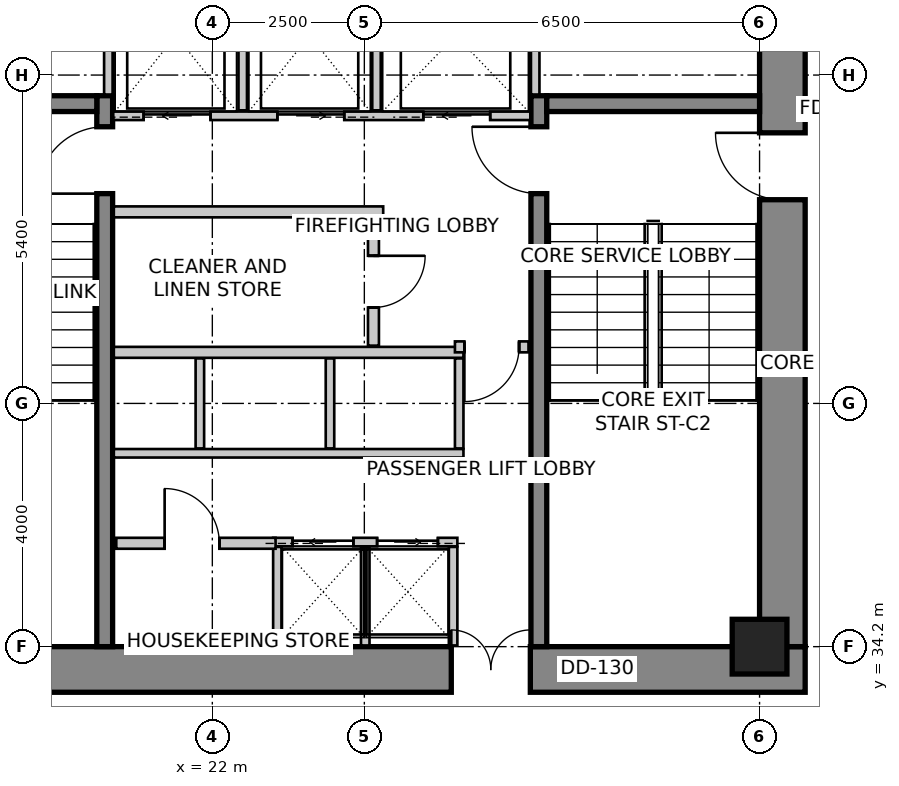
"""IFC4 building model, lengths in metres.
Left out: names, types, materials, properties, quantities, classifications, styles, units other than length and angle.
Written with IfcOpenShell. Run it as: python <this file> out.ifc"""

import sys

from ifc_helpers import new_model, si_unit, direction, frame, frame_2d, origin, origin_2d, place, context, subcontext, project, spatial, rectangle, extrude, source, transform, mapped, element, fill, save


model = new_model("IFC4")
c1 = context("Model", 3, precision=1e-05, world=origin(), true_north=direction((0.0, 1.0)))
c2 = subcontext(c1, "Body", "Model", "MODEL_VIEW")
j1 = project(units=[si_unit("LENGTHUNIT", "METRE"), si_unit("PLANEANGLEUNIT", "RADIAN")], contexts=[c1])
p1 = place(None, origin())
s1 = spatial("IfcSite", under=j1, at=p1, CompositionType="ELEMENT")
p2 = place(p1, origin())
s2 = spatial("IfcBuilding", under=s1, at=p2, CompositionType="ELEMENT")
p3 = place(p2, frame((0.0, 0.0, 110.6)))
s3 = spatial("IfcBuildingStorey", under=s2, at=p3, CompositionType="ELEMENT", Elevation=110.6)
p4 = place(p3, frame((15.85, 33.825, 0.0), z_axis=(0.0, 0.0, 1.0), x_axis=(1.0, 0.0, 0.0)))
e1 = element("IfcWall", 1, at=p4, inside=s3, PredefinedType="SHEAR", context=c2, shape_type="SweptSolid", body=[
    extrude(rectangle(XDim=15.9, YDim=0.75, at=frame_2d((7.95, 0.0))), origin(), (0.0, 0.0, 1.0), 3.6),
])
m1 = source(origin(), c2, "Body", "SweptSolid", [
    extrude(rectangle(XDim=1.3, YDim=2.15, at=frame_2d((0.65, 1.075))), frame((0.0, 0.385, 0.0), z_axis=(0.0, -1.0, 0.0), x_axis=(1.0, 0.0, 0.0)), (0.0, 0.0, 1.0), 0.77),
])
p5 = place(p4, frame((10.08, 0.0, 0.0)))
e2 = element("IfcOpeningElement", 2, at=p5, cuts=e1, PredefinedType="OPENING", context=c2, shape_type="MappedRepresentation", body=[
    mapped(m1, transform((0.0, 0.0, 0.0), scale=1.0)),
])
p6 = place(p3, frame((31.375, 34.2, 0.0), z_axis=(0.0, 0.0, 1.0), x_axis=(0.0, 1.0, 0.0)))
e3 = element("IfcWall", 3, at=p6, inside=s3, PredefinedType="SHEAR", context=c2, shape_type="SweptSolid", body=[
    extrude(rectangle(XDim=11.4, YDim=0.75, at=frame_2d((5.7, 0.0))), origin(), (0.0, 0.0, 1.0), 3.6),
])
m2 = source(origin(), c2, "Body", "SweptSolid", [
    extrude(rectangle(XDim=1.1, YDim=2.15, at=frame_2d((0.55, 1.075))), frame((0.0, 0.385, 0.0), z_axis=(0.0, -1.0, 0.0), x_axis=(1.0, 0.0, 0.0)), (0.0, 0.0, 1.0), 0.77),
])
p7 = place(p6, frame((7.35, 0.0, 0.0)))
e4 = element("IfcOpeningElement", 4, at=p7, cuts=e3, PredefinedType="OPENING", context=c2, shape_type="MappedRepresentation", body=[
    mapped(m2, transform((0.0, 0.0, 0.0), scale=1.0)),
])
p8 = place(p3, frame((20.23, 34.2, 0.0), z_axis=(0.0, 0.0, 1.0), x_axis=(0.0, 1.0, 0.0)))
e5 = element("IfcWall", 5, at=p8, inside=s3, PredefinedType="SHEAR", context=c2, shape_type="SweptSolid", body=[
    extrude(rectangle(XDim=9.06, YDim=0.26, at=frame_2d((4.53, 0.0))), origin(), (0.0, 0.0, 1.0), 3.6),
])
m3 = source(origin(), c2, "Body", "SweptSolid", [
    extrude(rectangle(XDim=1.1, YDim=2.15, at=frame_2d((0.55, 1.075))), frame((0.0, 0.14, 0.0), z_axis=(0.0, -1.0, 0.0), x_axis=(1.0, 0.0, 0.0)), (0.0, 0.0, 1.0), 0.28),
])
p9 = place(p8, frame((7.45, 0.0, 0.0)))
e6 = element("IfcOpeningElement", 6, at=p9, cuts=e5, PredefinedType="OPENING", context=c2, shape_type="MappedRepresentation", body=[
    mapped(m3, transform((0.0, 0.0, 0.0), scale=1.0)),
])
p10 = place(p3, frame((27.37, 34.2, 0.0), z_axis=(0.0, 0.0, 1.0), x_axis=(0.0, 1.0, 0.0)))
e7 = element("IfcWall", 7, at=p10, inside=s3, PredefinedType="SHEAR", context=c2, shape_type="SweptSolid", body=[
    extrude(rectangle(XDim=9.06, YDim=0.26, at=frame_2d((4.53, 0.0))), origin(), (0.0, 0.0, 1.0), 3.6),
])
p11 = place(p10, frame((7.45, 0.0, 0.0)))
e8 = element("IfcOpeningElement", 8, at=p11, cuts=e7, PredefinedType="OPENING", context=c2, shape_type="MappedRepresentation", body=[
    mapped(m3, transform((0.0, 0.0, 0.0), scale=1.0)),
])
for number, where, z_axis, x_axis in (
    (9, (16.6, 43.13, 0.0), (0.0, 0.0, 1.0), (1.0, 0.0, 0.0)),
    (10, (27.5, 43.13, 0.0), (0.0, 0.0, 1.0), (1.0, 0.0, 0.0)),
):
    element("IfcWall", number, at=place(p3, frame(where, z_axis=z_axis, x_axis=x_axis)), inside=s3, PredefinedType="SHEAR", context=c2, shape_type="SweptSolid", body=[
        extrude(rectangle(XDim=3.5, YDim=0.26, at=frame_2d((1.75, 0.0))), origin(), (0.0, 0.0, 1.0), 3.6),
    ])
m4 = source(origin(), c2, "Body", "SweptSolid", [
    extrude(rectangle(XDim=0.9, YDim=0.9, at=origin_2d()), origin(), (0.0, 0.0, 1.0), 3.6),
])
p12 = place(p3, frame((31.0, 34.2, 0.0), z_axis=(0.0, 0.0, 1.0), x_axis=(1.0, 0.0, 0.0)))
e11 = element("IfcColumn", 11, at=p12, inside=s3, PredefinedType="COLUMN", context=c2, shape_type="MappedRepresentation", body=[
    mapped(m4, transform((0.0, 0.0, 0.0), scale=1.0)),
])
p13 = place(p3, frame((20.37, 42.93, 0.0), z_axis=(0.0, 0.0, 1.0), x_axis=(1.0, 0.0, 0.0)))
e12 = element("IfcWall", 12, at=p13, inside=s3, PredefinedType="SOLIDWALL", context=c2, shape_type="SweptSolid", body=[
    extrude(rectangle(XDim=6.86, YDim=0.14, at=frame_2d((3.43, 0.0))), origin(), (0.0, 0.0, 1.0), 3.35),
])
m5 = source(origin(), c2, "Body", "SweptSolid", [
    extrude(rectangle(XDim=1.1, YDim=2.15, at=frame_2d((0.55, 1.075))), frame((0.0, 0.08, 0.0), z_axis=(0.0, -1.0, 0.0), x_axis=(1.0, 0.0, 0.0)), (0.0, 0.0, 1.0), 0.16),
])
p14 = place(p13, frame((0.5, 0.0, 0.0)))
e13 = element("IfcOpeningElement", 13, at=p14, cuts=e12, PredefinedType="OPENING", context=c2, shape_type="MappedRepresentation", body=[
    mapped(m5, transform((0.0, 0.0, 0.0), scale=1.0)),
])
p15 = place(p13, frame((2.7, 0.0, 0.0)))
e14 = element("IfcOpeningElement", 14, at=p15, cuts=e12, PredefinedType="OPENING", context=c2, shape_type="MappedRepresentation", body=[
    mapped(m5, transform((0.0, 0.0, 0.0), scale=1.0)),
])
p16 = place(p13, frame((5.1, 0.0, 0.0)))
e15 = element("IfcOpeningElement", 15, at=p16, cuts=e12, PredefinedType="OPENING", context=c2, shape_type="MappedRepresentation", body=[
    mapped(m5, transform((0.0, 0.0, 0.0), scale=1.0)),
])
for number, where, z_axis, x_axis in (
    (16, (20.29, 43.28, 0.0), (0.0, 0.0, 1.0), (0.0, 1.0, 0.0)),
    (17, (27.31, 43.28, 0.0), (0.0, 0.0, 1.0), (0.0, 1.0, 0.0)),
):
    element("IfcWall", number, at=place(p3, frame(where, z_axis=z_axis, x_axis=x_axis)), inside=s3, PredefinedType="SOLIDWALL", context=c2, shape_type="SweptSolid", body=[
        extrude(rectangle(XDim=2.3, YDim=0.14, at=frame_2d((1.15, 0.0))), origin(), (0.0, 0.0, 1.0), 3.35),
    ])
for number, where, z_axis, x_axis in (
    (18, (22.5, 43.02, 0.0), (0.0, 0.0, 1.0), (0.0, 1.0, 0.0)),
    (19, (24.7, 43.02, 0.0), (0.0, 0.0, 1.0), (0.0, 1.0, 0.0)),
):
    element("IfcWall", number, at=place(p3, frame(where, z_axis=z_axis, x_axis=x_axis)), inside=s3, PredefinedType="SOLIDWALL", context=c2, shape_type="SweptSolid", body=[
        extrude(rectangle(XDim=2.56, YDim=0.14, at=frame_2d((1.28, 0.0))), origin(), (0.0, 0.0, 1.0), 3.35),
    ])
p17 = place(p3, frame((23.0, 35.92, 0.0), z_axis=(0.0, 0.0, 1.0), x_axis=(1.0, 0.0, 0.0)))
e20 = element("IfcWall", 20, at=p17, inside=s3, PredefinedType="SOLIDWALL", context=c2, shape_type="SweptSolid", body=[
    extrude(rectangle(XDim=3.03, YDim=0.14, at=frame_2d((1.515, 0.0))), origin(), (0.0, 0.0, 1.0), 3.35),
])
m6 = source(origin(), c2, "Body", "SweptSolid", [
    extrude(rectangle(XDim=1.0, YDim=2.15, at=frame_2d((0.5, 1.075))), frame((0.0, 0.08, 0.0), z_axis=(0.0, -1.0, 0.0), x_axis=(1.0, 0.0, 0.0)), (0.0, 0.0, 1.0), 0.16),
])
p18 = place(p17, frame((0.32, 0.0, 0.0)))
e21 = element("IfcOpeningElement", 21, at=p18, cuts=e20, PredefinedType="OPENING", context=c2, shape_type="MappedRepresentation", body=[
    mapped(m6, transform((0.0, 0.0, 0.0), scale=1.0)),
])
p19 = place(p17, frame((1.71, 0.0, 0.0)))
e22 = element("IfcOpeningElement", 22, at=p19, cuts=e20, PredefinedType="OPENING", context=c2, shape_type="MappedRepresentation", body=[
    mapped(m6, transform((0.0, 0.0, 0.0), scale=1.0)),
])
for number, where, z_axis, x_axis in (
    (23, (25.96, 34.22, 0.0), (0.0, 0.0, 1.0), (0.0, 1.0, 0.0)),
    (24, (23.07, 34.22, 0.0), (0.0, 0.0, 1.0), (0.0, 1.0, 0.0)),
    (25, (24.515, 34.22, 0.0), (0.0, 0.0, 1.0), (0.0, 1.0, 0.0)),
):
    element("IfcWall", number, at=place(p3, frame(where, z_axis=z_axis, x_axis=x_axis)), inside=s3, PredefinedType="SOLIDWALL", context=c2, shape_type="SweptSolid", body=[
        extrude(rectangle(XDim=1.62, YDim=0.14, at=frame_2d((0.81, 0.0))), origin(), (0.0, 0.0, 1.0), 2.642),
    ])
p20 = place(p3, frame((20.38, 37.38, 0.0), z_axis=(0.0, 0.0, 1.0), x_axis=(1.0, 0.0, 0.0)))
e26 = element("IfcWall", 26, at=p20, inside=s3, PredefinedType="SOLIDWALL", context=c2, shape_type="SweptSolid", body=[
    extrude(rectangle(XDim=5.75, YDim=0.14, at=frame_2d((2.875, 0.0))), origin(), (0.0, 0.0, 1.0), 3.35),
])
p21 = place(p3, frame((20.38, 39.04, 0.0), z_axis=(0.0, 0.0, 1.0), x_axis=(1.0, 0.0, 0.0)))
e27 = element("IfcWall", 27, at=p21, inside=s3, PredefinedType="SOLIDWALL", context=c2, shape_type="SweptSolid", body=[
    extrude(rectangle(XDim=5.75, YDim=0.18, at=frame_2d((2.875, 0.0))), origin(), (0.0, 0.0, 1.0), 3.35),
])
for number, where, z_axis, x_axis in (
    (28, (26.06, 37.46, 0.0), (0.0, 0.0, 1.0), (0.0, 1.0, 0.0)),
    (29, (21.795, 37.46, 0.0), (0.0, 0.0, 1.0), (0.0, 1.0, 0.0)),
    (30, (23.935, 37.46, 0.0), (0.0, 0.0, 1.0), (0.0, 1.0, 0.0)),
):
    element("IfcWall", number, at=place(p3, frame(where, z_axis=z_axis, x_axis=x_axis)), inside=s3, PredefinedType="SOLIDWALL", context=c2, shape_type="SweptSolid", body=[
        extrude(rectangle(XDim=1.48, YDim=0.14, at=frame_2d((0.74, 0.0))), origin(), (0.0, 0.0, 1.0), 3.35),
    ])
p22 = place(p3, frame((24.81, 41.35, 0.0), z_axis=(0.0, 0.0, 1.0), x_axis=(-1.0, 0.0, 0.0)))
e31 = element("IfcWall", 31, at=p22, inside=s3, PredefinedType="PARTITIONING", context=c2, shape_type="SweptSolid", body=[
    extrude(rectangle(XDim=4.43, YDim=0.18, at=frame_2d((2.215, 0.0))), origin(), (0.0, 0.0, 1.0), 3.35),
])
p23 = place(p3, frame((24.65, 41.256, 0.0), z_axis=(0.0, 0.0, 1.0), x_axis=(0.0, -1.0, 0.0)))
e32 = element("IfcWall", 32, at=p23, inside=s3, PredefinedType="PARTITIONING", context=c2, shape_type="SweptSolid", body=[
    extrude(rectangle(XDim=2.106, YDim=0.18, at=frame_2d((1.053, 0.0))), origin(), (0.0, 0.0, 1.0), 3.35),
])
m7 = source(origin(), c2, "Body", "SweptSolid", [
    extrude(rectangle(XDim=0.85, YDim=2.15, at=frame_2d((0.425, 1.075))), frame((0.0, 0.1, 0.0), z_axis=(0.0, -1.0, 0.0), x_axis=(1.0, 0.0, 0.0)), (0.0, 0.0, 1.0), 0.2),
])
p24 = place(p23, frame((0.628, 0.0, 0.0)))
e33 = element("IfcOpeningElement", 33, at=p24, cuts=e32, PredefinedType="OPENING", context=c2, shape_type="MappedRepresentation", body=[
    mapped(m7, transform((0.0, 0.0, 0.0), scale=1.0)),
])
p25 = place(p3, frame((27.2, 39.13, 0.0), z_axis=(0.0, 0.0, 1.0), x_axis=(-1.0, 0.0, 0.0)))
e34 = element("IfcWall", 34, at=p25, inside=s3, PredefinedType="PARTITIONING", context=c2, shape_type="SweptSolid", body=[
    extrude(rectangle(XDim=1.21, YDim=0.18, at=frame_2d((0.605, 0.0))), origin(), (0.0, 0.0, 1.0), 3.35),
])
m8 = source(origin(), c2, "Body", "SweptSolid", [
    extrude(rectangle(XDim=0.9, YDim=2.15, at=frame_2d((0.45, 1.075))), frame((0.0, 0.1, 0.0), z_axis=(0.0, -1.0, 0.0), x_axis=(1.0, 0.0, 0.0)), (0.0, 0.0, 1.0), 0.2),
])
p26 = place(p25, frame((0.155, 0.0, 0.0)))
e35 = element("IfcOpeningElement", 35, at=p26, cuts=e34, PredefinedType="OPENING", context=c2, shape_type="MappedRepresentation", body=[
    mapped(m8, transform((0.0, 0.0, 0.0), scale=1.0)),
])
p27 = place(p3, frame((20.42, 35.9, 0.0), z_axis=(0.0, 0.0, 1.0), x_axis=(1.0, 0.0, 0.0)))
e36 = element("IfcWall", 36, at=p27, inside=s3, PredefinedType="PARTITIONING", context=c2, shape_type="SweptSolid", body=[
    extrude(rectangle(XDim=2.62, YDim=0.18, at=frame_2d((1.31, 0.0))), origin(), (0.0, 0.0, 1.0), 3.35),
])
p28 = place(p27, frame((0.796, 0.0, 0.0)))
e37 = element("IfcOpeningElement", 37, at=p28, cuts=e36, PredefinedType="OPENING", context=c2, shape_type="MappedRepresentation", body=[
    mapped(m8, transform((0.0, 0.0, 0.0), scale=1.0)),
])
m9 = source(origin(), c2, "Body", "SweptSolid", [
    extrude(rectangle(XDim=1.1, YDim=2.15, at=frame_2d((0.55, 1.075))), frame((0.0, 0.025, 0.0), z_axis=(0.0, -1.0, 0.0), x_axis=(1.0, 0.0, 0.0)), (0.0, 0.0, 1.0), 0.05),
])
p29 = place(p14, origin())
e38 = element("IfcDoor", 38, at=p29, inside=s3, OperationType="SLIDING_TO_LEFT", PredefinedType="DOOR", context=c2, shape_type="MappedRepresentation", body=[
    mapped(m9, transform((0.0, 0.0, 0.0), scale=1.0)),
])
fill(e13, e38)
p30 = place(p15, origin())
e39 = element("IfcDoor", 39, at=p30, inside=s3, OperationType="SLIDING_TO_RIGHT", PredefinedType="DOOR", context=c2, shape_type="MappedRepresentation", body=[
    mapped(m9, transform((0.0, 0.0, 0.0), scale=1.0)),
])
fill(e14, e39)
m10 = source(origin(), c2, "Body", "SweptSolid", [
    extrude(rectangle(XDim=1.1, YDim=2.15, at=frame_2d((0.55, 1.075))), frame((0.0, 0.025, 0.0), z_axis=(0.0, -1.0, 0.0), x_axis=(1.0, 0.0, 0.0)), (0.0, 0.0, 1.0), 0.05),
])
p31 = place(p16, origin())
e40 = element("IfcDoor", 40, at=p31, inside=s3, OperationType="SLIDING_TO_LEFT", PredefinedType="DOOR", context=c2, shape_type="MappedRepresentation", body=[
    mapped(m10, transform((0.0, 0.0, 0.0), scale=1.0)),
])
fill(e15, e40)
m11 = source(origin(), c2, "Body", "SweptSolid", [
    extrude(rectangle(XDim=1.0, YDim=2.15, at=frame_2d((0.5, 1.075))), frame((0.0, 0.025, 0.0), z_axis=(0.0, -1.0, 0.0), x_axis=(1.0, 0.0, 0.0)), (0.0, 0.0, 1.0), 0.05),
])
p32 = place(p18, origin())
e41 = element("IfcDoor", 41, at=p32, inside=s3, OperationType="SLIDING_TO_LEFT", PredefinedType="DOOR", context=c2, shape_type="MappedRepresentation", body=[
    mapped(m11, transform((0.0, 0.0, 0.0), scale=1.0)),
])
fill(e21, e41)
p33 = place(p19, origin())
e42 = element("IfcDoor", 42, at=p33, inside=s3, OperationType="SLIDING_TO_RIGHT", PredefinedType="DOOR", context=c2, shape_type="MappedRepresentation", body=[
    mapped(m11, transform((0.0, 0.0, 0.0), scale=1.0)),
])
fill(e22, e42)
m12 = source(origin(), c2, "Body", "SweptSolid", [
    extrude(rectangle(XDim=1.1, YDim=2.15, at=frame_2d((0.55, 1.075))), frame((0.0, 0.025, 0.0), z_axis=(0.0, -1.0, 0.0), x_axis=(1.0, 0.0, 0.0)), (0.0, 0.0, 1.0), 0.05),
])
p34 = place(p9, origin())
e43 = element("IfcDoor", 43, at=p34, inside=s3, OperationType="SINGLE_SWING_LEFT", PredefinedType="DOOR", context=c2, shape_type="MappedRepresentation", body=[
    mapped(m12, transform((0.0, 0.0, 0.0), scale=1.0)),
])
fill(e6, e43)
p35 = place(p11, origin())
e44 = element("IfcDoor", 44, at=p35, inside=s3, OperationType="SINGLE_SWING_RIGHT", PredefinedType="DOOR", context=c2, shape_type="MappedRepresentation", body=[
    mapped(m12, transform((0.0, 0.0, 0.0), scale=1.0)),
])
fill(e8, e44)
p36 = place(p7, origin())
e45 = element("IfcDoor", 45, at=p36, inside=s3, OperationType="SINGLE_SWING_RIGHT", PredefinedType="DOOR", context=c2, shape_type="MappedRepresentation", body=[
    mapped(m12, transform((0.0, 0.0, 0.0), scale=1.0)),
])
fill(e4, e45)
m13 = source(origin(), c2, "Body", "SweptSolid", [
    extrude(rectangle(XDim=1.3, YDim=2.15, at=frame_2d((0.65, 1.075))), frame((0.0, 0.025, 0.0), z_axis=(0.0, -1.0, 0.0), x_axis=(1.0, 0.0, 0.0)), (0.0, 0.0, 1.0), 0.05),
])
p37 = place(p5, origin())
e46 = element("IfcDoor", 46, at=p37, inside=s3, OperationType="DOUBLE_DOOR_SINGLE_SWING", PredefinedType="DOOR", context=c2, shape_type="MappedRepresentation", body=[
    mapped(m13, transform((0.0, 0.0, 0.0), scale=1.0)),
])
fill(e2, e46)
m14 = source(origin(), c2, "Body", "SweptSolid", [
    extrude(rectangle(XDim=0.85, YDim=2.15, at=frame_2d((0.425, 1.075))), frame((0.0, 0.025, 0.0), z_axis=(0.0, -1.0, 0.0), x_axis=(1.0, 0.0, 0.0)), (0.0, 0.0, 1.0), 0.05),
])
p38 = place(p24, origin())
e47 = element("IfcDoor", 47, at=p38, inside=s3, OperationType="SINGLE_SWING_LEFT", PredefinedType="DOOR", context=c2, shape_type="MappedRepresentation", body=[
    mapped(m14, transform((0.0, 0.0, 0.0), scale=1.0)),
])
fill(e33, e47)
m15 = source(origin(), c2, "Body", "SweptSolid", [
    extrude(rectangle(XDim=0.9, YDim=2.15, at=frame_2d((0.45, 1.075))), frame((0.0, 0.025, 0.0), z_axis=(0.0, -1.0, 0.0), x_axis=(1.0, 0.0, 0.0)), (0.0, 0.0, 1.0), 0.05),
])
p39 = place(p26, origin())
e48 = element("IfcDoor", 48, at=p39, inside=s3, OperationType="SINGLE_SWING_RIGHT", PredefinedType="DOOR", context=c2, shape_type="MappedRepresentation", body=[
    mapped(m15, transform((0.0, 0.0, 0.0), scale=1.0)),
])
fill(e35, e48)
p40 = place(p28, origin())
e49 = element("IfcDoor", 49, at=p40, inside=s3, OperationType="SINGLE_SWING_LEFT", PredefinedType="DOOR", context=c2, shape_type="MappedRepresentation", body=[
    mapped(m15, transform((0.0, 0.0, 0.0), scale=1.0)),
])
fill(e37, e49)
save(model, sys.argv[1])
